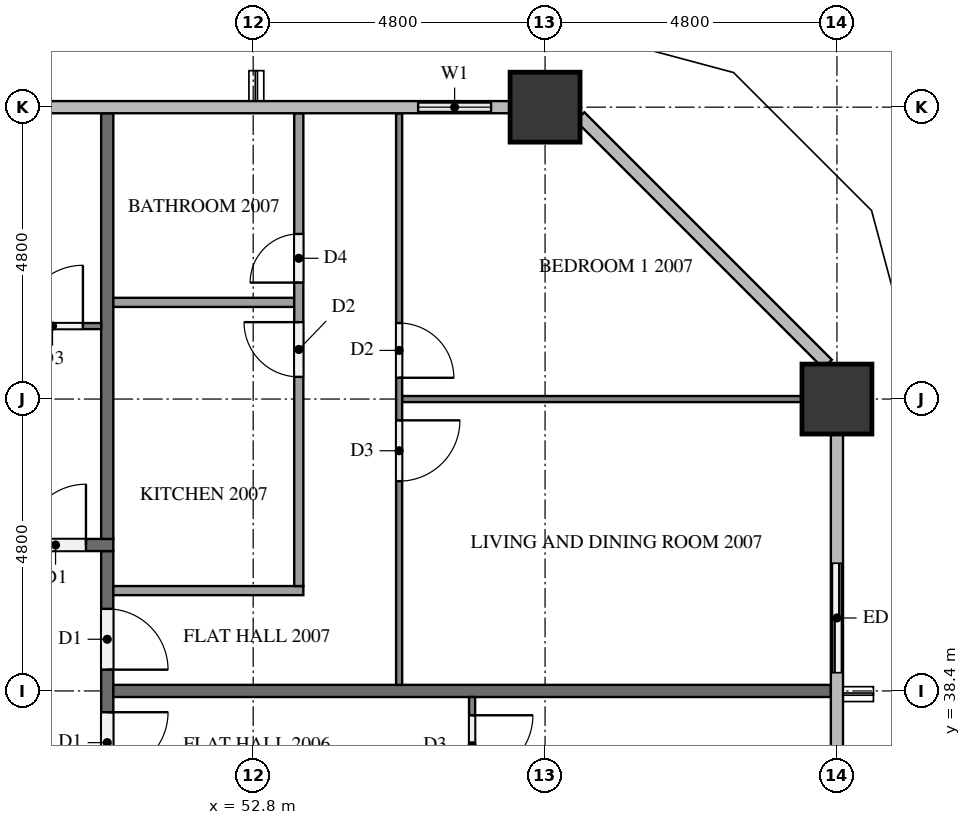
"""IFC4 building model, lengths in metres.
Left out: names, types, materials, properties, quantities, classifications, styles, units other than length and angle.
Written with IfcOpenShell. Run it as: python <this file> out.ifc"""

import sys

from ifc_helpers import new_model, si_unit, direction, frame, frame_2d, origin, origin_2d, place, context, subcontext, project, spatial, rectangle, extrude, element, fill, save


model = new_model("IFC4")
c1 = context("Model", 3, precision=1e-05, world=origin(), true_north=direction((0.0, 1.0)))
c2 = subcontext(c1, "Body", "Model", "MODEL_VIEW")
j1 = project(units=[si_unit("LENGTHUNIT", "METRE"), si_unit("PLANEANGLEUNIT", "RADIAN")], contexts=[c1])
p1 = place(None, origin())
s1 = spatial("IfcSite", under=j1, at=p1, CompositionType="ELEMENT")
p2 = place(p1, origin())
s2 = spatial("IfcBuilding", under=s1, at=p2, CompositionType="ELEMENT")
p3 = place(p2, frame((0.0, 0.0, 80.3)))
s3 = spatial("IfcBuildingStorey", under=s2, at=p3, CompositionType="ELEMENT", Elevation=80.3)
for number, where, z_axis, x_axis in (
    (1, (62.4, 43.2, 0.0), (0.0, 0.0, 1.0), (1.0, 0.0, 0.0)),
    (2, (57.6, 48.0, 0.0), (0.0, 0.0, 1.0), (1.0, 0.0, 0.0)),
):
    element("IfcColumn", number, at=place(p3, frame(where, z_axis=z_axis, x_axis=x_axis)), inside=s3, PredefinedType="COLUMN", context=c2, shape_type="SweptSolid", body=[
        extrude(rectangle(XDim=1.15, YDim=1.15, at=origin_2d()), origin(), (0.0, 0.0, 1.0), 3.1),
    ])
p4 = place(p3, frame((62.4, 38.4, 0.0), z_axis=(0.0, 0.0, 1.0), x_axis=(0.0, 1.0, 0.0)))
e3 = element("IfcWall", 3, at=p4, inside=s3, PredefinedType="SOLIDWALL", context=c2, shape_type="SweptSolid", body=[
    extrude(rectangle(XDim=2.4, YDim=0.15, at=frame_2d((1.2, 0.0))), origin(), (0.0, 0.0, 1.0), 3.1),
])
p5 = place(p4, frame((0.3, 0.0, 0.0)))
e4 = element("IfcOpeningElement", 4, at=p5, cuts=e3, PredefinedType="OPENING", context=c2, shape_type="SweptSolid", body=[
    extrude(rectangle(XDim=1.8, YDim=2.4, at=frame_2d((0.9, 1.2))), frame((0.0, 0.085, 0.0), z_axis=(0.0, -1.0, 0.0), x_axis=(1.0, 0.0, 0.0)), (0.0, 0.0, 1.0), 0.17),
])
p6 = place(p3, frame((57.025, 48.0, 0.0), z_axis=(0.0, 0.0, 1.0), x_axis=(-1.0, 0.0, 0.0)))
e5 = element("IfcWall", 5, at=p6, inside=s3, PredefinedType="SOLIDWALL", context=c2, shape_type="SweptSolid", body=[
    extrude(rectangle(XDim=1.825, YDim=0.15, at=frame_2d((0.913, 0.0))), origin(), (0.0, 0.0, 1.0), 3.1),
])
p7 = place(p6, frame((0.312, 0.0, 0.9)))
e6 = element("IfcOpeningElement", 6, at=p7, cuts=e5, PredefinedType="OPENING", context=c2, shape_type="SweptSolid", body=[
    extrude(rectangle(XDim=1.2, YDim=1.4, at=frame_2d((0.6, 0.7))), frame((0.0, 0.085, 0.0), z_axis=(0.0, -1.0, 0.0), x_axis=(1.0, 0.0, 0.0)), (0.0, 0.0, 1.0), 0.17),
])
p8 = place(p3, frame((50.4, 40.7, 0.0), z_axis=(0.0, 0.0, 1.0), x_axis=(0.0, -1.0, 0.0)))
e7 = element("IfcWall", 7, at=p8, inside=s3, PredefinedType="PARTITIONING", context=c2, shape_type="SweptSolid", body=[
    extrude(rectangle(XDim=28.6, YDim=0.2, at=frame_2d((14.3, 0.0))), origin(), (0.0, 0.0, 1.0), 3.1),
])
p9 = place(p8, frame((26.65, 0.0, 0.0)))
e8 = element("IfcOpeningElement", 8, at=p9, cuts=e7, PredefinedType="OPENING", context=c2, shape_type="SweptSolid", body=[
    extrude(rectangle(XDim=1.0, YDim=2.1, at=frame_2d((0.5, 1.05))), frame((0.0, 0.11, 0.0), z_axis=(0.0, -1.0, 0.0), x_axis=(1.0, 0.0, 0.0)), (0.0, 0.0, 1.0), 0.22),
])
p10 = place(p8, frame((9.85, 0.0, 0.0)))
e9 = element("IfcOpeningElement", 9, at=p10, cuts=e7, PredefinedType="OPENING", context=c2, shape_type="SweptSolid", body=[
    extrude(rectangle(XDim=1.0, YDim=2.1, at=frame_2d((0.5, 1.05))), frame((0.0, 0.11, 0.0), z_axis=(0.0, -1.0, 0.0), x_axis=(1.0, 0.0, 0.0)), (0.0, 0.0, 1.0), 0.22),
])
p11 = place(p8, frame((2.65, 0.0, 0.0)))
e10 = element("IfcOpeningElement", 10, at=p11, cuts=e7, PredefinedType="OPENING", context=c2, shape_type="SweptSolid", body=[
    extrude(rectangle(XDim=1.0, YDim=2.1, at=frame_2d((0.5, 1.05))), frame((0.0, 0.11, 0.0), z_axis=(0.0, -1.0, 0.0), x_axis=(1.0, 0.0, 0.0)), (0.0, 0.0, 1.0), 0.22),
])
p12 = place(p8, frame((0.95, 0.0, 0.0)))
e11 = element("IfcOpeningElement", 11, at=p12, cuts=e7, PredefinedType="OPENING", context=c2, shape_type="SweptSolid", body=[
    extrude(rectangle(XDim=1.0, YDim=2.1, at=frame_2d((0.5, 1.05))), frame((0.0, 0.11, 0.0), z_axis=(0.0, -1.0, 0.0), x_axis=(1.0, 0.0, 0.0)), (0.0, 0.0, 1.0), 0.22),
])
p13 = place(p3, frame((11.9, 40.8, 0.0), z_axis=(0.0, 0.0, 1.0), x_axis=(1.0, 0.0, 0.0)))
e12 = element("IfcWall", 12, at=p13, inside=s3, PredefinedType="PARTITIONING", context=c2, shape_type="SweptSolid", body=[
    extrude(rectangle(XDim=38.6, YDim=0.2, at=frame_2d((19.3, 0.0))), origin(), (0.0, 0.0, 1.0), 3.1),
])
p14 = place(p13, frame((37.15, 0.0, 0.0)))
e13 = element("IfcOpeningElement", 13, at=p14, cuts=e12, PredefinedType="OPENING", context=c2, shape_type="SweptSolid", body=[
    extrude(rectangle(XDim=1.0, YDim=2.1, at=frame_2d((0.5, 1.05))), frame((0.0, 0.11, 0.0), z_axis=(0.0, -1.0, 0.0), x_axis=(1.0, 0.0, 0.0)), (0.0, 0.0, 1.0), 0.22),
])
p15 = place(p13, frame((10.05, 0.0, 0.0)))
e14 = element("IfcOpeningElement", 14, at=p15, cuts=e12, PredefinedType="OPENING", context=c2, shape_type="SweptSolid", body=[
    extrude(rectangle(XDim=1.0, YDim=2.1, at=frame_2d((0.5, 1.05))), frame((0.0, 0.11, 0.0), z_axis=(0.0, -1.0, 0.0), x_axis=(1.0, 0.0, 0.0)), (0.0, 0.0, 1.0), 0.22),
])
p16 = place(p13, frame((8.35, 0.0, 0.0)))
e15 = element("IfcOpeningElement", 15, at=p16, cuts=e12, PredefinedType="OPENING", context=c2, shape_type="SweptSolid", body=[
    extrude(rectangle(XDim=1.0, YDim=2.1, at=frame_2d((0.5, 1.05))), frame((0.0, 0.11, 0.0), z_axis=(0.0, -1.0, 0.0), x_axis=(1.0, 0.0, 0.0)), (0.0, 0.0, 1.0), 0.22),
])
p17 = place(p3, frame((50.5, 38.4, 0.0), z_axis=(0.0, 0.0, 1.0), x_axis=(1.0, 0.0, 0.0)))
e16 = element("IfcWall", 16, at=p17, inside=s3, PredefinedType="PARTITIONING", context=c2, shape_type="SweptSolid", body=[
    extrude(rectangle(XDim=11.8, YDim=0.2, at=frame_2d((5.9, 0.0))), origin(), (0.0, 0.0, 1.0), 3.1),
])
p18 = place(p3, frame((50.4, 40.9, 0.0), z_axis=(0.0, 0.0, 1.0), x_axis=(0.0, 1.0, 0.0)))
e17 = element("IfcWall", 17, at=p18, inside=s3, PredefinedType="PARTITIONING", context=c2, shape_type="SweptSolid", body=[
    extrude(rectangle(XDim=7.0, YDim=0.2, at=frame_2d((3.5, 0.0))), origin(), (0.0, 0.0, 1.0), 3.1),
])
p19 = place(p3, frame((56.4, 38.3, 0.0), z_axis=(0.0, 0.0, 1.0), x_axis=(0.0, -1.0, 0.0)))
e18 = element("IfcWall", 18, at=p19, inside=s3, PredefinedType="PARTITIONING", context=c2, shape_type="SweptSolid", body=[
    extrude(rectangle(XDim=7.0, YDim=0.1, at=frame_2d((3.5, 0.0))), origin(), (0.0, 0.0, 1.0), 3.1),
])
p20 = place(p19, frame((0.3, 0.0, 0.0)))
e19 = element("IfcOpeningElement", 19, at=p20, cuts=e18, PredefinedType="OPENING", context=c2, shape_type="SweptSolid", body=[
    extrude(rectangle(XDim=1.0, YDim=2.1, at=frame_2d((0.5, 1.05))), frame((0.0, 0.06, 0.0), z_axis=(0.0, -1.0, 0.0), x_axis=(1.0, 0.0, 0.0)), (0.0, 0.0, 1.0), 0.12),
])
p21 = place(p3, frame((55.25, 43.2, 0.0), z_axis=(0.0, 0.0, 1.0), x_axis=(1.0, 0.0, 0.0)))
e20 = element("IfcWall", 20, at=p21, inside=s3, PredefinedType="PARTITIONING", context=c2, shape_type="SweptSolid", body=[
    extrude(rectangle(XDim=6.575, YDim=0.1, at=frame_2d((3.288, 0.0))), origin(), (0.0, 0.0, 1.0), 3.1),
])
p22 = place(p3, frame((55.2, 47.9, 0.0), z_axis=(0.0, 0.0, 1.0), x_axis=(0.0, -1.0, 0.0)))
e21 = element("IfcWall", 21, at=p22, inside=s3, PredefinedType="PARTITIONING", context=c2, shape_type="SweptSolid", body=[
    extrude(rectangle(XDim=9.4, YDim=0.1, at=frame_2d((4.7, 0.0))), origin(), (0.0, 0.0, 1.0), 3.1),
])
p23 = place(p22, frame((5.05, 0.0, 0.0)))
e22 = element("IfcOpeningElement", 22, at=p23, cuts=e21, PredefinedType="OPENING", context=c2, shape_type="SweptSolid", body=[
    extrude(rectangle(XDim=1.0, YDim=2.1, at=frame_2d((0.5, 1.05))), frame((0.0, 0.06, 0.0), z_axis=(0.0, -1.0, 0.0), x_axis=(1.0, 0.0, 0.0)), (0.0, 0.0, 1.0), 0.12),
])
p24 = place(p22, frame((3.45, 0.0, 0.0)))
e23 = element("IfcOpeningElement", 23, at=p24, cuts=e21, PredefinedType="OPENING", context=c2, shape_type="SweptSolid", body=[
    extrude(rectangle(XDim=0.9, YDim=2.1, at=frame_2d((0.45, 1.05))), frame((0.0, 0.06, 0.0), z_axis=(0.0, -1.0, 0.0), x_axis=(1.0, 0.0, 0.0)), (0.0, 0.0, 1.0), 0.12),
])
p25 = place(p3, frame((50.5, 44.79, 0.0), z_axis=(0.0, 0.0, 1.0), x_axis=(1.0, 0.0, 0.0)))
e24 = element("IfcWall", 24, at=p25, inside=s3, PredefinedType="PARTITIONING", context=c2, shape_type="SweptSolid", body=[
    extrude(rectangle(XDim=2.975, YDim=0.15, at=frame_2d((1.488, 0.0))), origin(), (0.0, 0.0, 1.0), 3.1),
])
p26 = place(p3, frame((50.5, 40.05, 0.0), z_axis=(0.0, 0.0, 1.0), x_axis=(1.0, 0.0, 0.0)))
e25 = element("IfcWall", 25, at=p26, inside=s3, PredefinedType="PARTITIONING", context=c2, shape_type="SweptSolid", body=[
    extrude(rectangle(XDim=3.125, YDim=0.15, at=frame_2d((1.562, 0.0))), origin(), (0.0, 0.0, 1.0), 3.1),
])
p27 = place(p3, frame((53.55, 40.125, 0.0), z_axis=(0.0, 0.0, 1.0), x_axis=(0.0, 1.0, 0.0)))
e26 = element("IfcWall", 26, at=p27, inside=s3, PredefinedType="PARTITIONING", context=c2, shape_type="SweptSolid", body=[
    extrude(rectangle(XDim=7.775, YDim=0.15, at=frame_2d((3.887, 0.0))), origin(), (0.0, 0.0, 1.0), 3.1),
])
p28 = place(p27, frame((3.44, 0.0, 0.0)))
e27 = element("IfcOpeningElement", 27, at=p28, cuts=e26, PredefinedType="OPENING", context=c2, shape_type="SweptSolid", body=[
    extrude(rectangle(XDim=0.9, YDim=2.1, at=frame_2d((0.45, 1.05))), frame((0.0, 0.085, 0.0), z_axis=(0.0, -1.0, 0.0), x_axis=(1.0, 0.0, 0.0)), (0.0, 0.0, 1.0), 0.17),
])
p29 = place(p27, frame((4.99, 0.0, 0.0)))
e28 = element("IfcOpeningElement", 28, at=p29, cuts=e26, PredefinedType="OPENING", context=c2, shape_type="SweptSolid", body=[
    extrude(rectangle(XDim=0.8, YDim=2.1, at=frame_2d((0.4, 1.05))), frame((0.0, 0.085, 0.0), z_axis=(0.0, -1.0, 0.0), x_axis=(1.0, 0.0, 0.0)), (0.0, 0.0, 1.0), 0.17),
])
p30 = place(p3, frame((33.7, 44.4, 0.0), z_axis=(0.0, 0.0, 1.0), x_axis=(1.0, 0.0, 0.0)))
e29 = element("IfcWall", 29, at=p30, inside=s3, PredefinedType="PARTITIONING", context=c2, shape_type="SweptSolid", body=[
    extrude(rectangle(XDim=16.6, YDim=0.1, at=frame_2d((8.3, 0.0))), origin(), (0.0, 0.0, 1.0), 3.1),
])
p31 = place(p30, frame((15.3, 0.0, 0.0)))
e30 = element("IfcOpeningElement", 30, at=p31, cuts=e29, PredefinedType="OPENING", context=c2, shape_type="SweptSolid", body=[
    extrude(rectangle(XDim=1.0, YDim=2.1, at=frame_2d((0.5, 1.05))), frame((0.0, 0.06, 0.0), z_axis=(0.0, -1.0, 0.0), x_axis=(1.0, 0.0, 0.0)), (0.0, 0.0, 1.0), 0.12),
])
p32 = place(p30, frame((5.05, 0.0, 0.0)))
e31 = element("IfcOpeningElement", 31, at=p32, cuts=e29, PredefinedType="OPENING", context=c2, shape_type="SweptSolid", body=[
    extrude(rectangle(XDim=0.9, YDim=2.1, at=frame_2d((0.45, 1.05))), frame((0.0, 0.06, 0.0), z_axis=(0.0, -1.0, 0.0), x_axis=(1.0, 0.0, 0.0)), (0.0, 0.0, 1.0), 0.12),
])
p33 = place(p30, frame((3.45, 0.0, 0.0)))
e32 = element("IfcOpeningElement", 32, at=p33, cuts=e29, PredefinedType="OPENING", context=c2, shape_type="SweptSolid", body=[
    extrude(rectangle(XDim=0.9, YDim=2.1, at=frame_2d((0.45, 1.05))), frame((0.0, 0.06, 0.0), z_axis=(0.0, -1.0, 0.0), x_axis=(1.0, 0.0, 0.0)), (0.0, 0.0, 1.0), 0.12),
])
p34 = place(p5, origin())
e33 = element("IfcDoor", 33, at=p34, inside=s3, OperationType="SLIDING_TO_LEFT", PredefinedType="DOOR", context=c2, shape_type="SweptSolid", body=[
    extrude(rectangle(XDim=1.8, YDim=2.4, at=frame_2d((0.9, 1.2))), frame((0.0, 0.025, 0.0), z_axis=(0.0, -1.0, 0.0), x_axis=(1.0, 0.0, 0.0)), (0.0, 0.0, 1.0), 0.05),
])
fill(e4, e33)
p35 = place(p7, origin())
e34 = element("IfcWindow", 34, at=p35, inside=s3, PartitioningType="SINGLE_PANEL", PredefinedType="WINDOW", context=c2, shape_type="SweptSolid", body=[
    extrude(rectangle(XDim=1.2, YDim=1.4, at=frame_2d((0.6, 0.7))), frame((0.0, 0.03, 0.0), z_axis=(0.0, -1.0, 0.0), x_axis=(1.0, 0.0, 0.0)), (0.0, 0.0, 1.0), 0.06),
])
fill(e6, e34)
p36 = place(p11, origin())
e35 = element("IfcDoor", 35, at=p36, inside=s3, OperationType="SINGLE_SWING_LEFT", PredefinedType="DOOR", context=c2, shape_type="SweptSolid", body=[
    extrude(rectangle(XDim=1.0, YDim=2.1, at=frame_2d((0.5, 1.05))), frame((0.0, 0.025, 0.0), z_axis=(0.0, -1.0, 0.0), x_axis=(1.0, 0.0, 0.0)), (0.0, 0.0, 1.0), 0.05),
])
fill(e10, e35)
p37 = place(p12, origin())
e36 = element("IfcDoor", 36, at=p37, inside=s3, OperationType="SINGLE_SWING_RIGHT", PredefinedType="DOOR", context=c2, shape_type="SweptSolid", body=[
    extrude(rectangle(XDim=1.0, YDim=2.1, at=frame_2d((0.5, 1.05))), frame((0.0, 0.025, 0.0), z_axis=(0.0, -1.0, 0.0), x_axis=(1.0, 0.0, 0.0)), (0.0, 0.0, 1.0), 0.05),
])
fill(e11, e36)
p38 = place(p14, origin())
e37 = element("IfcDoor", 37, at=p38, inside=s3, OperationType="SINGLE_SWING_RIGHT", PredefinedType="DOOR", context=c2, shape_type="SweptSolid", body=[
    extrude(rectangle(XDim=1.0, YDim=2.1, at=frame_2d((0.5, 1.05))), frame((0.0, 0.025, 0.0), z_axis=(0.0, -1.0, 0.0), x_axis=(1.0, 0.0, 0.0)), (0.0, 0.0, 1.0), 0.05),
])
fill(e13, e37)
p39 = place(p20, origin())
e38 = element("IfcDoor", 38, at=p39, inside=s3, OperationType="SINGLE_SWING_LEFT", PredefinedType="DOOR", context=c2, shape_type="SweptSolid", body=[
    extrude(rectangle(XDim=1.0, YDim=2.1, at=frame_2d((0.5, 1.05))), frame((0.0, 0.025, 0.0), z_axis=(0.0, -1.0, 0.0), x_axis=(1.0, 0.0, 0.0)), (0.0, 0.0, 1.0), 0.05),
])
fill(e19, e38)
p40 = place(p23, origin())
e39 = element("IfcDoor", 39, at=p40, inside=s3, OperationType="SINGLE_SWING_LEFT", PredefinedType="DOOR", context=c2, shape_type="SweptSolid", body=[
    extrude(rectangle(XDim=1.0, YDim=2.1, at=frame_2d((0.5, 1.05))), frame((0.0, 0.025, 0.0), z_axis=(0.0, -1.0, 0.0), x_axis=(1.0, 0.0, 0.0)), (0.0, 0.0, 1.0), 0.05),
])
fill(e22, e39)
p41 = place(p24, origin())
e40 = element("IfcDoor", 40, at=p41, inside=s3, OperationType="SINGLE_SWING_RIGHT", PredefinedType="DOOR", context=c2, shape_type="SweptSolid", body=[
    extrude(rectangle(XDim=0.9, YDim=2.1, at=frame_2d((0.45, 1.05))), frame((0.0, 0.025, 0.0), z_axis=(0.0, -1.0, 0.0), x_axis=(1.0, 0.0, 0.0)), (0.0, 0.0, 1.0), 0.05),
])
fill(e23, e40)
p42 = place(p28, origin())
e41 = element("IfcDoor", 41, at=p42, inside=s3, OperationType="SINGLE_SWING_RIGHT", PredefinedType="DOOR", context=c2, shape_type="SweptSolid", body=[
    extrude(rectangle(XDim=0.9, YDim=2.1, at=frame_2d((0.45, 1.05))), frame((0.0, 0.025, 0.0), z_axis=(0.0, -1.0, 0.0), x_axis=(1.0, 0.0, 0.0)), (0.0, 0.0, 1.0), 0.05),
])
fill(e27, e41)
p43 = place(p29, origin())
e42 = element("IfcDoor", 42, at=p43, inside=s3, OperationType="SINGLE_SWING_LEFT", PredefinedType="DOOR", context=c2, shape_type="SweptSolid", body=[
    extrude(rectangle(XDim=0.8, YDim=2.1, at=frame_2d((0.4, 1.05))), frame((0.0, 0.025, 0.0), z_axis=(0.0, -1.0, 0.0), x_axis=(1.0, 0.0, 0.0)), (0.0, 0.0, 1.0), 0.05),
])
fill(e28, e42)
p44 = place(p31, origin())
e43 = element("IfcDoor", 43, at=p44, inside=s3, OperationType="SINGLE_SWING_RIGHT", PredefinedType="DOOR", context=c2, shape_type="SweptSolid", body=[
    extrude(rectangle(XDim=1.0, YDim=2.1, at=frame_2d((0.5, 1.05))), frame((0.0, 0.025, 0.0), z_axis=(0.0, -1.0, 0.0), x_axis=(1.0, 0.0, 0.0)), (0.0, 0.0, 1.0), 0.05),
])
fill(e30, e43)
save(model, sys.argv[1])
